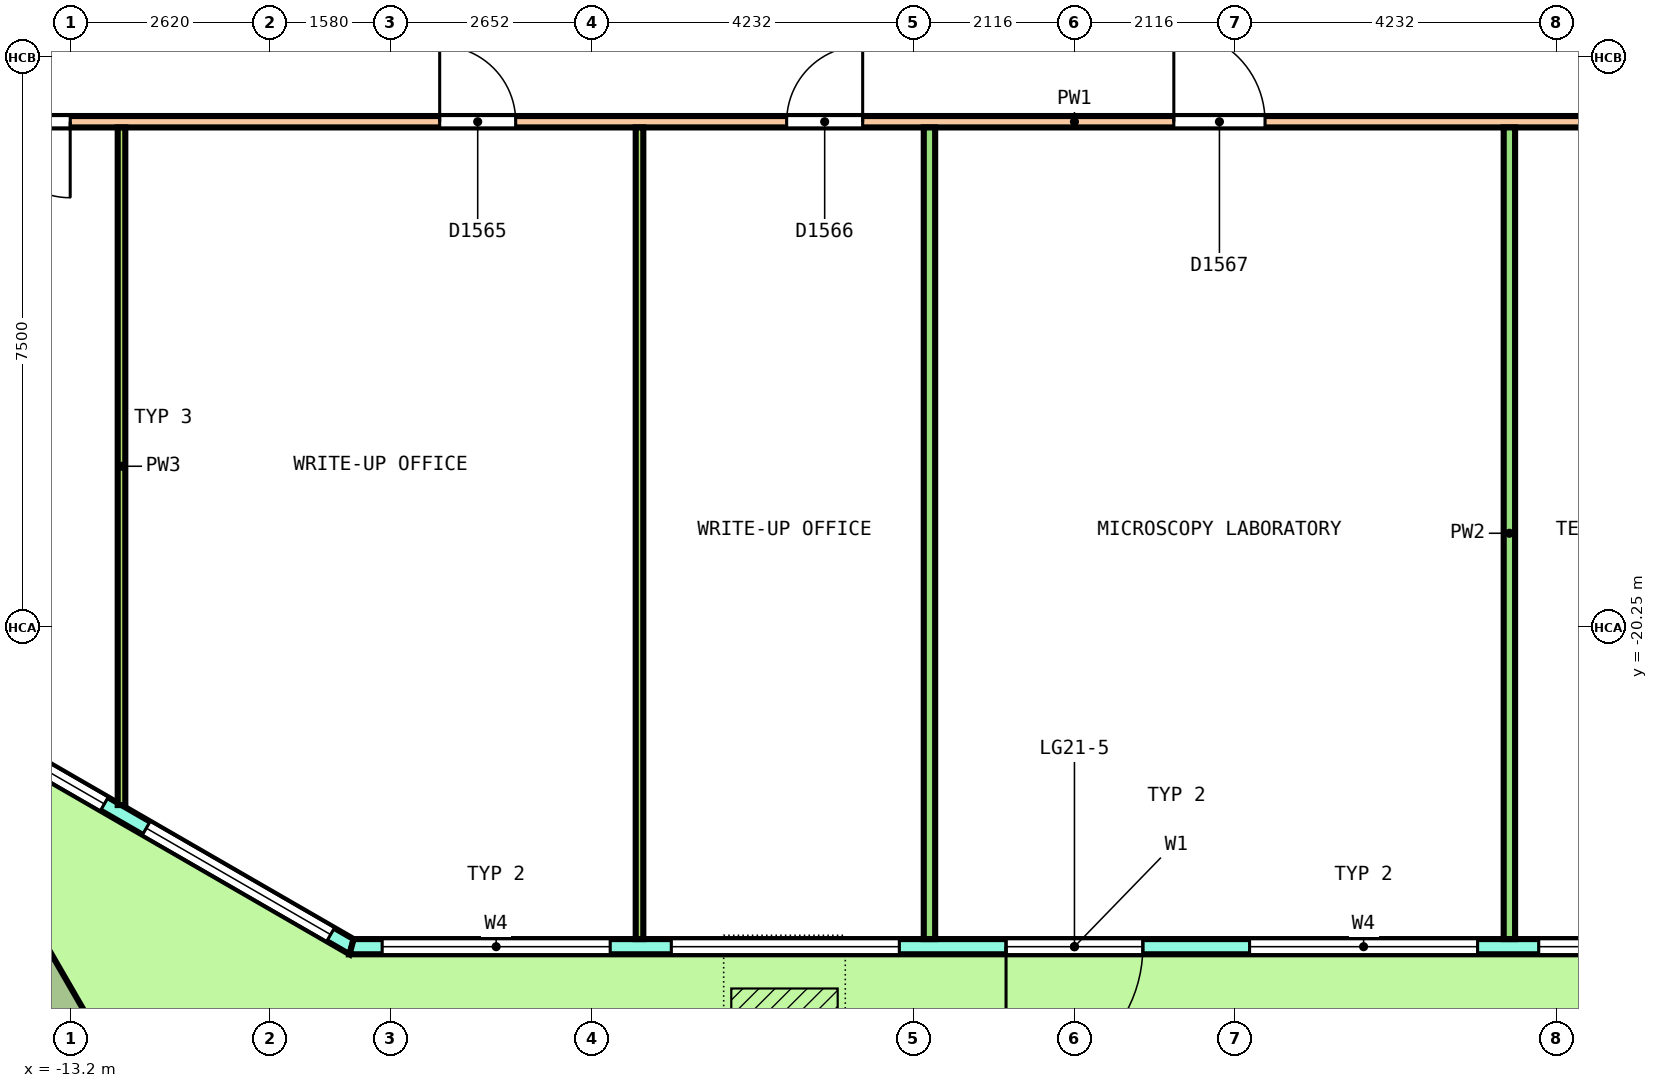
"""IFC4 building model, lengths in metres.
Left out: names, types, materials, properties, quantities, classifications, styles, units other than length and angle.
Written with IfcOpenShell. Run it as: python <this file> out.ifc"""

import sys

from ifc_helpers import new_model, si_unit, direction, frame, frame_2d, origin, origin_2d, place, context, subcontext, project, spatial, polyline, rectangle, outline, extrude, element, fill, save


model = new_model("IFC4")
c1 = context("Model", 3, precision=1e-05, world=origin(), true_north=direction((0.0, 1.0)))
c2 = subcontext(c1, "Body", "Model", "MODEL_VIEW")
j1 = project(units=[si_unit("LENGTHUNIT", "METRE"), si_unit("PLANEANGLEUNIT", "RADIAN")], contexts=[c1])
p1 = place(None, origin())
s1 = spatial("IfcSite", under=j1, at=p1, CompositionType="ELEMENT")
p2 = place(p1, origin())
s2 = spatial("IfcBuilding", under=s1, at=p2, CompositionType="ELEMENT")
p3 = place(p2, frame((0.0, 0.0, 98.4)))
s3 = spatial("IfcBuildingStorey", under=s2, at=p3, CompositionType="ELEMENT", Elevation=98.4)
p4 = place(p3, frame((-13.887, -25.159, 0.0), z_axis=(0.018132595726, -0.031445896907, 0.999340965106), x_axis=(0.865469370655, -0.499974541214, -0.031436071558)))
e1 = element("IfcColumn", 1, at=p4, inside=s3, PredefinedType="COLUMN", context=c2, shape_type="SweptSolid", body=[
    extrude(rectangle(XDim=1.35, YDim=1.35, at=origin_2d()), origin(), (0.0, 0.0, 1.0), 4.053),
])
p5 = place(p3, frame((-15.464, -21.016, 0.0), z_axis=(0.0, 0.0, 1.0), x_axis=(0.866029458321, -0.49999297727, 0.0)))
e2 = element("IfcWall", 2, at=p5, inside=s3, PredefinedType="SOLIDWALL", context=c2, shape_type="SweptSolid", body=[
    extrude(outline(polyline([(-0.027, -0.1), (1.128, -0.1), (2.282, -0.1), (3.437, -0.1), (4.592, -0.1), (5.747, -0.1), (6.901, -0.1), (6.848, 0.1), (5.711, 0.1), (4.574, 0.1), (3.437, 0.1), (2.301, 0.1), (1.164, 0.1), (0.027, 0.1), (-0.027, -0.1)])), origin(), (0.0, 0.0, 1.0), 4.1),
])
p6 = place(p5, frame((0.319, 0.0, 0.1)))
e3 = element("IfcOpeningElement", 3, at=p6, cuts=e2, PredefinedType="OPENING", context=c2, shape_type="SweptSolid", body=[
    extrude(rectangle(XDim=2.8, YDim=2.9, at=frame_2d((1.4, 1.45))), frame((0.0, 0.11, 0.0), z_axis=(0.0, -1.0, 0.0), x_axis=(1.0, 0.0, 0.0)), (0.0, 0.0, 1.0), 0.22),
])
p7 = place(p5, frame((3.756, 0.0, 0.1)))
e4 = element("IfcOpeningElement", 4, at=p7, cuts=e2, PredefinedType="OPENING", context=c2, shape_type="SweptSolid", body=[
    extrude(rectangle(XDim=2.8, YDim=2.9, at=frame_2d((1.4, 1.45))), frame((0.0, 0.11, 0.0), z_axis=(0.0, -1.0, 0.0), x_axis=(1.0, 0.0, 0.0)), (0.0, 0.0, 1.0), 0.22),
])
p8 = place(p3, frame((-9.51, -24.453, 0.0), z_axis=(0.0, 0.0, 1.0), x_axis=(1.0, 0.0, 0.0)))
e5 = element("IfcWall", 5, at=p8, inside=s3, PredefinedType="SOLIDWALL", context=c2, shape_type="SweptSolid", body=[
    extrude(outline(polyline([(-0.027, -0.1), (0.977, -0.1), (1.981, -0.1), (2.985, -0.1), (3.989, -0.1), (4.993, -0.1), (5.997, -0.1), (7.0, -0.1), (8.004, -0.1), (9.008, -0.1), (10.012, -0.1), (11.016, -0.1), (12.02, -0.1), (13.024, -0.1), (14.028, -0.1), (15.032, -0.1), (16.036, -0.1), (17.04, -0.1), (18.043, -0.1), (19.047, -0.1), (18.994, 0.1), (17.995, 0.1), (16.997, 0.1), (15.999, 0.1), (15.001, 0.1), (14.002, 0.1), (13.004, 0.1), (12.006, 0.1), (11.008, 0.1), (10.009, 0.1), (9.011, 0.1), (8.013, 0.1), (7.015, 0.1), (6.016, 0.1), (5.018, 0.1), (4.02, 0.1), (3.022, 0.1), (2.023, 0.1), (1.025, 0.1), (0.027, 0.1), (-0.027, -0.1)])), origin(), (0.0, 0.0, 1.0), 4.1),
])
p9 = place(p8, frame((0.402, 0.0, 0.1)))
e6 = element("IfcOpeningElement", 6, at=p9, cuts=e5, PredefinedType="OPENING", context=c2, shape_type="SweptSolid", body=[
    extrude(rectangle(XDim=3.0, YDim=2.9, at=frame_2d((1.5, 1.45))), frame((0.0, 0.11, 0.0), z_axis=(0.0, -1.0, 0.0), x_axis=(1.0, 0.0, 0.0)), (0.0, 0.0, 1.0), 0.22),
])
p10 = place(p8, frame((4.206, 0.0, 0.1)))
e7 = element("IfcOpeningElement", 7, at=p10, cuts=e5, PredefinedType="OPENING", context=c2, shape_type="SweptSolid", body=[
    extrude(rectangle(XDim=3.0, YDim=2.9, at=frame_2d((1.5, 1.45))), frame((0.0, 0.11, 0.0), z_axis=(0.0, -1.0, 0.0), x_axis=(1.0, 0.0, 0.0)), (0.0, 0.0, 1.0), 0.22),
])
p11 = place(p8, frame((8.61, 0.0, 0.0)))
e8 = element("IfcOpeningElement", 8, at=p11, cuts=e5, PredefinedType="OPENING", context=c2, shape_type="SweptSolid", body=[
    extrude(rectangle(XDim=1.8, YDim=2.4, at=frame_2d((0.9, 1.2))), frame((0.0, 0.11, 0.0), z_axis=(0.0, -1.0, 0.0), x_axis=(1.0, 0.0, 0.0)), (0.0, 0.0, 1.0), 0.22),
])
p12 = place(p8, frame((8.61, 0.0, 2.55)))
e9 = element("IfcOpeningElement", 9, at=p12, cuts=e5, PredefinedType="OPENING", context=c2, shape_type="SweptSolid", body=[
    extrude(rectangle(XDim=1.8, YDim=0.45, at=frame_2d((0.9, 0.225))), frame((0.0, 0.11, 0.0), z_axis=(0.0, -1.0, 0.0), x_axis=(1.0, 0.0, 0.0)), (0.0, 0.0, 1.0), 0.22),
])
p13 = place(p8, frame((11.814, 0.0, 0.1)))
e10 = element("IfcOpeningElement", 10, at=p13, cuts=e5, PredefinedType="OPENING", context=c2, shape_type="SweptSolid", body=[
    extrude(rectangle(XDim=3.0, YDim=2.9, at=frame_2d((1.5, 1.45))), frame((0.0, 0.11, 0.0), z_axis=(0.0, -1.0, 0.0), x_axis=(1.0, 0.0, 0.0)), (0.0, 0.0, 1.0), 0.22),
])
p14 = place(p8, frame((15.618, 0.0, 0.1)))
e11 = element("IfcOpeningElement", 11, at=p14, cuts=e5, PredefinedType="OPENING", context=c2, shape_type="SweptSolid", body=[
    extrude(rectangle(XDim=3.0, YDim=2.9, at=frame_2d((1.5, 1.45))), frame((0.0, 0.11, 0.0), z_axis=(0.0, -1.0, 0.0), x_axis=(1.0, 0.0, 0.0)), (0.0, 0.0, 1.0), 0.22),
])
p15 = place(p3, frame((-15.95, -13.6, 0.0), z_axis=(0.0, 0.0, 1.0), x_axis=(1.0, 0.0, 0.0)))
e12 = element("IfcWall", 12, at=p15, inside=s3, PredefinedType="PARTITIONING", context=c2, shape_type="SweptSolid", body=[
    extrude(rectangle(XDim=31.9, YDim=0.15, at=frame_2d((15.95, 0.0))), origin(), (0.0, 0.0, 1.0), 3.05),
])
p16 = place(p15, frame((1.738, 0.0, 0.0)))
e13 = element("IfcOpeningElement", 13, at=p16, cuts=e12, PredefinedType="OPENING", context=c2, shape_type="SweptSolid", body=[
    extrude(rectangle(XDim=1.0, YDim=2.1, at=frame_2d((0.5, 1.05))), frame((0.0, 0.085, 0.0), z_axis=(0.0, -1.0, 0.0), x_axis=(1.0, 0.0, 0.0)), (0.0, 0.0, 1.0), 0.17),
])
p17 = place(p15, frame((7.599, 0.0, 0.0)))
e14 = element("IfcOpeningElement", 14, at=p17, cuts=e12, PredefinedType="OPENING", context=c2, shape_type="SweptSolid", body=[
    extrude(rectangle(XDim=1.0, YDim=2.1, at=frame_2d((0.5, 1.05))), frame((0.0, 0.085, 0.0), z_axis=(0.0, -1.0, 0.0), x_axis=(1.0, 0.0, 0.0)), (0.0, 0.0, 1.0), 0.17),
])
p18 = place(p15, frame((12.164, 0.0, 0.0)))
e15 = element("IfcOpeningElement", 15, at=p18, cuts=e12, PredefinedType="OPENING", context=c2, shape_type="SweptSolid", body=[
    extrude(rectangle(XDim=1.0, YDim=2.1, at=frame_2d((0.5, 1.05))), frame((0.0, 0.085, 0.0), z_axis=(0.0, -1.0, 0.0), x_axis=(1.0, 0.0, 0.0)), (0.0, 0.0, 1.0), 0.17),
])
p19 = place(p15, frame((17.257, 0.0, 0.0)))
e16 = element("IfcOpeningElement", 16, at=p19, cuts=e12, PredefinedType="OPENING", context=c2, shape_type="SweptSolid", body=[
    extrude(rectangle(XDim=1.2, YDim=2.1, at=frame_2d((0.6, 1.05))), frame((0.0, 0.085, 0.0), z_axis=(0.0, -1.0, 0.0), x_axis=(1.0, 0.0, 0.0)), (0.0, 0.0, 1.0), 0.17),
])
p20 = place(p15, frame((22.692, 0.0, 0.0)))
e17 = element("IfcOpeningElement", 17, at=p20, cuts=e12, PredefinedType="OPENING", context=c2, shape_type="SweptSolid", body=[
    extrude(rectangle(XDim=1.2, YDim=2.1, at=frame_2d((0.6, 1.05))), frame((0.0, 0.085, 0.0), z_axis=(0.0, -1.0, 0.0), x_axis=(1.0, 0.0, 0.0)), (0.0, 0.0, 1.0), 0.17),
])
p21 = place(p15, frame((27.887, 0.0, 0.0)))
e18 = element("IfcOpeningElement", 18, at=p21, cuts=e12, PredefinedType="OPENING", context=c2, shape_type="SweptSolid", body=[
    extrude(rectangle(XDim=1.2, YDim=2.1, at=frame_2d((0.6, 1.05))), frame((0.0, 0.085, 0.0), z_axis=(0.0, -1.0, 0.0), x_axis=(1.0, 0.0, 0.0)), (0.0, 0.0, 1.0), 0.17),
])
for number, where, z_axis, x_axis in (
    (19, (-1.907, -24.353, 0.0), (0.0, 0.0, 1.0), (0.0, 1.0, 0.0)),
    (20, (5.722, -24.353, 0.0), (0.0, 0.0, 1.0), (0.0, 1.0, 0.0)),
):
    element("IfcWall", number, at=place(p3, frame(where, z_axis=z_axis, x_axis=x_axis)), inside=s3, PredefinedType="PARTITIONING", context=c2, shape_type="SweptSolid", body=[
        extrude(rectangle(XDim=10.678, YDim=0.15, at=frame_2d((5.339, 0.0))), origin(), (0.0, 0.0, 1.0), 3.05),
    ])
p22 = place(p3, frame((-12.537, -22.59, 0.0), z_axis=(0.0, 0.0, 1.0), x_axis=(0.0, 1.0, 0.0)))
e21 = element("IfcWall", 21, at=p22, inside=s3, PredefinedType="PARTITIONING", context=c2, shape_type="SweptSolid", body=[
    extrude(rectangle(XDim=8.915, YDim=0.1, at=frame_2d((4.458, 0.0))), origin(), (0.0, 0.0, 1.0), 3.05),
])
p23 = place(p3, frame((-5.722, -24.353, 0.0), z_axis=(0.0, 0.0, 1.0), x_axis=(0.0, 1.0, 0.0)))
e22 = element("IfcWall", 22, at=p23, inside=s3, PredefinedType="PARTITIONING", context=c2, shape_type="SweptSolid", body=[
    extrude(rectangle(XDim=10.678, YDim=0.1, at=frame_2d((5.339, 0.0))), origin(), (0.0, 0.0, 1.0), 3.05),
])
p24 = place(p6, origin())
e23 = element("IfcWindow", 23, at=p24, inside=s3, PartitioningType="SINGLE_PANEL", PredefinedType="WINDOW", context=c2, shape_type="SweptSolid", body=[
    extrude(rectangle(XDim=2.8, YDim=2.9, at=frame_2d((1.4, 1.45))), frame((0.0, 0.03, 0.0), z_axis=(0.0, -1.0, 0.0), x_axis=(1.0, 0.0, 0.0)), (0.0, 0.0, 1.0), 0.06),
])
fill(e3, e23)
p25 = place(p7, origin())
e24 = element("IfcWindow", 24, at=p25, inside=s3, PartitioningType="SINGLE_PANEL", PredefinedType="WINDOW", context=c2, shape_type="SweptSolid", body=[
    extrude(rectangle(XDim=2.8, YDim=2.9, at=frame_2d((1.4, 1.45))), frame((0.0, 0.03, 0.0), z_axis=(0.0, -1.0, 0.0), x_axis=(1.0, 0.0, 0.0)), (0.0, 0.0, 1.0), 0.06),
])
fill(e4, e24)
p26 = place(p9, origin())
e25 = element("IfcWindow", 25, at=p26, inside=s3, PartitioningType="SINGLE_PANEL", PredefinedType="WINDOW", context=c2, shape_type="SweptSolid", body=[
    extrude(rectangle(XDim=3.0, YDim=2.9, at=frame_2d((1.5, 1.45))), frame((0.0, 0.03, 0.0), z_axis=(0.0, -1.0, 0.0), x_axis=(1.0, 0.0, 0.0)), (0.0, 0.0, 1.0), 0.06),
])
fill(e6, e25)
p27 = place(p10, origin())
e26 = element("IfcWindow", 26, at=p27, inside=s3, PartitioningType="SINGLE_PANEL", PredefinedType="WINDOW", context=c2, shape_type="SweptSolid", body=[
    extrude(rectangle(XDim=3.0, YDim=2.9, at=frame_2d((1.5, 1.45))), frame((0.0, 0.03, 0.0), z_axis=(0.0, -1.0, 0.0), x_axis=(1.0, 0.0, 0.0)), (0.0, 0.0, 1.0), 0.06),
])
fill(e7, e26)
p28 = place(p11, origin())
e27 = element("IfcDoor", 27, at=p28, inside=s3, OperationType="DOUBLE_DOOR_SINGLE_SWING", PredefinedType="DOOR", context=c2, shape_type="SweptSolid", body=[
    extrude(rectangle(XDim=1.8, YDim=2.4, at=frame_2d((0.9, 1.2))), frame((0.0, 0.025, 0.0), z_axis=(0.0, -1.0, 0.0), x_axis=(1.0, 0.0, 0.0)), (0.0, 0.0, 1.0), 0.05),
])
fill(e8, e27)
p29 = place(p12, origin())
e28 = element("IfcWindow", 28, at=p29, inside=s3, PartitioningType="SINGLE_PANEL", PredefinedType="WINDOW", context=c2, shape_type="SweptSolid", body=[
    extrude(rectangle(XDim=1.8, YDim=0.45, at=frame_2d((0.9, 0.225))), frame((0.0, 0.03, 0.0), z_axis=(0.0, -1.0, 0.0), x_axis=(1.0, 0.0, 0.0)), (0.0, 0.0, 1.0), 0.06),
])
fill(e9, e28)
p30 = place(p13, origin())
e29 = element("IfcWindow", 29, at=p30, inside=s3, PartitioningType="SINGLE_PANEL", PredefinedType="WINDOW", context=c2, shape_type="SweptSolid", body=[
    extrude(rectangle(XDim=3.0, YDim=2.9, at=frame_2d((1.5, 1.45))), frame((0.0, 0.03, 0.0), z_axis=(0.0, -1.0, 0.0), x_axis=(1.0, 0.0, 0.0)), (0.0, 0.0, 1.0), 0.06),
])
fill(e10, e29)
p31 = place(p14, origin())
e30 = element("IfcWindow", 30, at=p31, inside=s3, PartitioningType="SINGLE_PANEL", PredefinedType="WINDOW", context=c2, shape_type="SweptSolid", body=[
    extrude(rectangle(XDim=3.0, YDim=2.9, at=frame_2d((1.5, 1.45))), frame((0.0, 0.03, 0.0), z_axis=(0.0, -1.0, 0.0), x_axis=(1.0, 0.0, 0.0)), (0.0, 0.0, 1.0), 0.06),
])
fill(e11, e30)
p32 = place(p16, origin())
e31 = element("IfcDoor", 31, at=p32, inside=s3, OperationType="SINGLE_SWING_LEFT", PredefinedType="DOOR", context=c2, shape_type="SweptSolid", body=[
    extrude(rectangle(XDim=1.0, YDim=2.1, at=frame_2d((0.5, 1.05))), frame((0.0, 0.025, 0.0), z_axis=(0.0, -1.0, 0.0), x_axis=(1.0, 0.0, 0.0)), (0.0, 0.0, 1.0), 0.05),
])
fill(e13, e31)
p33 = place(p17, origin())
e32 = element("IfcDoor", 32, at=p33, inside=s3, OperationType="SINGLE_SWING_LEFT", PredefinedType="DOOR", context=c2, shape_type="SweptSolid", body=[
    extrude(rectangle(XDim=1.0, YDim=2.1, at=frame_2d((0.5, 1.05))), frame((0.0, 0.025, 0.0), z_axis=(0.0, -1.0, 0.0), x_axis=(1.0, 0.0, 0.0)), (0.0, 0.0, 1.0), 0.05),
])
fill(e14, e32)
p34 = place(p18, origin())
e33 = element("IfcDoor", 33, at=p34, inside=s3, OperationType="SINGLE_SWING_RIGHT", PredefinedType="DOOR", context=c2, shape_type="SweptSolid", body=[
    extrude(rectangle(XDim=1.0, YDim=2.1, at=frame_2d((0.5, 1.05))), frame((0.0, 0.025, 0.0), z_axis=(0.0, -1.0, 0.0), x_axis=(1.0, 0.0, 0.0)), (0.0, 0.0, 1.0), 0.05),
])
fill(e15, e33)
p35 = place(p19, origin())
e34 = element("IfcDoor", 34, at=p35, inside=s3, OperationType="DOUBLE_DOOR_SINGLE_SWING", PredefinedType="DOOR", context=c2, shape_type="SweptSolid", body=[
    extrude(rectangle(XDim=1.2, YDim=2.1, at=frame_2d((0.6, 1.05))), frame((0.0, 0.025, 0.0), z_axis=(0.0, -1.0, 0.0), x_axis=(1.0, 0.0, 0.0)), (0.0, 0.0, 1.0), 0.05),
])
fill(e16, e34)
save(model, sys.argv[1])
